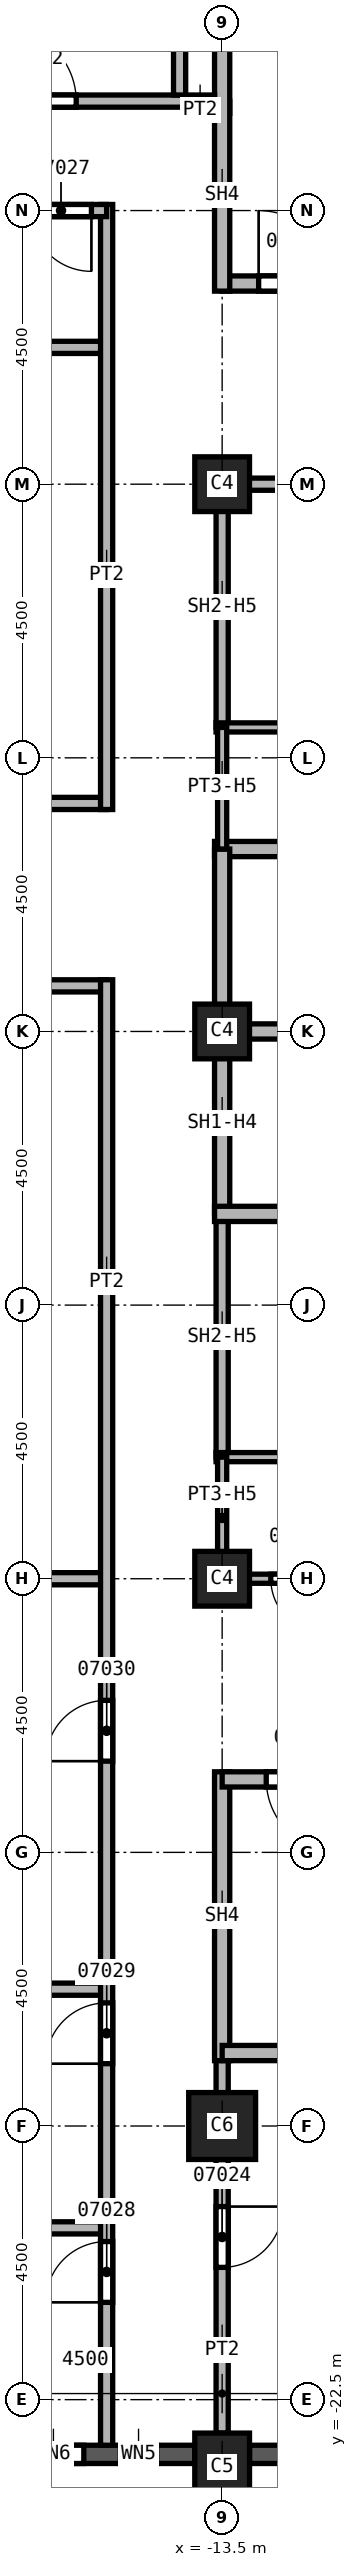
"""IFC4 building model, lengths in metres.
Left out: names, types, materials, properties, quantities, classifications, styles, units other than length and angle.
Written with IfcOpenShell. Run it as: python <this file> out.ifc"""

import sys

from ifc_helpers import new_model, si_unit, direction, frame, frame_2d, origin, origin_2d, place, context, subcontext, project, spatial, rectangle, extrude, element, fill, save


model = new_model("IFC4")
c1 = context("Model", 3, precision=1e-05, world=origin(), true_north=direction((0.0, 1.0)))
c2 = subcontext(c1, "Body", "Model", "MODEL_VIEW")
j1 = project(units=[si_unit("LENGTHUNIT", "METRE"), si_unit("PLANEANGLEUNIT", "RADIAN")], contexts=[c1])
p1 = place(None, origin())
s1 = spatial("IfcSite", under=j1, at=p1, CompositionType="ELEMENT")
p2 = place(p1, origin())
s2 = spatial("IfcBuilding", under=s1, at=p2, CompositionType="ELEMENT")
p3 = place(p2, frame((0.0, 0.0, 138.0)))
s3 = spatial("IfcBuildingStorey", under=s2, at=p3, CompositionType="ELEMENT", Elevation=138.0)
p4 = place(p3, frame((-13.5, -18.0, 0.0), z_axis=(0.0, 0.0, 1.0), x_axis=(1.0, 0.0, 0.0)))
e1 = element("IfcColumn", 1, at=p4, inside=s3, PredefinedType="COLUMN", context=c2, shape_type="SweptSolid", body=[
    extrude(rectangle(XDim=1.1, YDim=1.1, at=origin_2d()), origin(), (0.0, 0.0, 1.0), 3.7),
])
for number, where, z_axis, x_axis in (
    (2, (-13.5, 0.0, 0.0), (0.0, 0.0, 1.0), (1.0, 0.0, 0.0)),
    (3, (-13.5, 9.0, 0.0), (0.0, 0.0, 1.0), (1.0, 0.0, 0.0)),
    (4, (-13.5, -9.0, 0.0), (0.0, 0.0, 1.0), (1.0, 0.0, 0.0)),
):
    element("IfcColumn", number, at=place(p3, frame(where, z_axis=z_axis, x_axis=x_axis)), inside=s3, PredefinedType="COLUMN", context=c2, shape_type="SweptSolid", body=[
        extrude(rectangle(XDim=0.9, YDim=0.9, at=origin_2d()), origin(), (0.0, 0.0, 1.0), 3.7),
    ])
p5 = place(p3, frame((-13.5, -23.6, 0.0), z_axis=(0.0, 0.0, 1.0), x_axis=(1.0, 0.0, 0.0)))
e5 = element("IfcColumn", 5, at=p5, inside=s3, PredefinedType="COLUMN", context=c2, shape_type="SweptSolid", body=[
    extrude(rectangle(XDim=0.9, YDim=1.1, at=origin_2d()), origin(), (0.0, 0.0, 1.0), 3.7),
])
p6 = place(p3, frame((-17.55, -23.4, 0.0), z_axis=(0.0, 0.0, 1.0), x_axis=(1.0, 0.0, 0.0)))
e6 = element("IfcWall", 6, at=p6, inside=s3, PredefinedType="SOLIDWALL", context=c2, shape_type="SweptSolid", body=[
    extrude(rectangle(XDim=3.6, YDim=0.3, at=frame_2d((1.8, 0.0))), origin(), (0.0, 0.0, 1.0), 3.1),
])
p7 = place(p6, frame((0.775, 0.0, 0.8)))
e7 = element("IfcOpeningElement", 7, at=p7, cuts=e6, PredefinedType="OPENING", context=c2, shape_type="SweptSolid", body=[
    extrude(rectangle(XDim=1.0, YDim=1.95, at=frame_2d((0.5, 0.975))), frame((0.0, 0.15, 0.0), z_axis=(0.0, -1.0, 0.0), x_axis=(1.0, 0.0, 0.0)), (0.0, 0.0, 1.0), 0.3),
])
p8 = place(p6, frame((2.375, 0.0, 0.8)))
e8 = element("IfcOpeningElement", 8, at=p8, cuts=e6, PredefinedType="OPENING", context=c2, shape_type="SweptSolid", body=[
    extrude(rectangle(XDim=0.6, YDim=1.95, at=frame_2d((0.3, 0.975))), frame((0.0, 0.15, 0.0), z_axis=(0.0, -1.0, 0.0), x_axis=(1.0, 0.0, 0.0)), (0.0, 0.0, 1.0), 0.3),
])
p9 = place(p3, frame((-13.05, -23.4, 0.0), z_axis=(0.0, 0.0, 1.0), x_axis=(1.0, 0.0, 0.0)))
e9 = element("IfcWall", 9, at=p9, inside=s3, PredefinedType="SOLIDWALL", context=c2, shape_type="SweptSolid", body=[
    extrude(rectangle(XDim=3.6, YDim=0.3, at=frame_2d((1.8, 0.0))), origin(), (0.0, 0.0, 1.0), 3.1),
])
p10 = place(p9, frame((0.6, 0.0, 0.8)))
e10 = element("IfcOpeningElement", 10, at=p10, cuts=e9, PredefinedType="OPENING", context=c2, shape_type="SweptSolid", body=[
    extrude(rectangle(XDim=2.4, YDim=1.95, at=frame_2d((1.2, 0.975))), frame((0.0, 0.15, 0.0), z_axis=(0.0, -1.0, 0.0), x_axis=(1.0, 0.0, 0.0)), (0.0, 0.0, 1.0), 0.3),
])
p11 = place(p3, frame((-33.85, 3.75, 0.0), z_axis=(0.0, 0.0, 1.0), x_axis=(1.0, 0.0, 0.0)))
e11 = element("IfcWall", 11, at=p11, inside=s3, PredefinedType="PARTITIONING", context=c2, shape_type="SweptSolid", body=[
    extrude(rectangle(XDim=18.45, YDim=0.2, at=frame_2d((9.225, 0.0))), origin(), (0.0, 0.0, 1.0), 3.7),
])
p12 = place(p11, frame((10.3, 0.0, 0.0)))
e12 = element("IfcOpeningElement", 12, at=p12, cuts=e11, PredefinedType="OPENING", context=c2, shape_type="SweptSolid", body=[
    extrude(rectangle(XDim=1.0, YDim=2.1, at=frame_2d((0.5, 1.05))), frame((0.0, 0.1, 0.0), z_axis=(0.0, -1.0, 0.0), x_axis=(1.0, 0.0, 0.0)), (0.0, 0.0, 1.0), 0.2),
])
p13 = place(p3, frame((-15.4, 0.75, 0.0), z_axis=(0.0, 0.0, 1.0), x_axis=(-1.0, 0.0, 0.0)))
e13 = element("IfcWall", 13, at=p13, inside=s3, PredefinedType="PARTITIONING", context=c2, shape_type="SweptSolid", body=[
    extrude(rectangle(XDim=18.45, YDim=0.2, at=frame_2d((9.225, 0.0))), origin(), (0.0, 0.0, 1.0), 3.7),
])
p14 = place(p13, frame((5.35, 0.0, 0.0)))
e14 = element("IfcOpeningElement", 14, at=p14, cuts=e13, PredefinedType="OPENING", context=c2, shape_type="SweptSolid", body=[
    extrude(rectangle(XDim=1.0, YDim=2.1, at=frame_2d((0.5, 1.05))), frame((0.0, 0.1, 0.0), z_axis=(0.0, -1.0, 0.0), x_axis=(1.0, 0.0, 0.0)), (0.0, 0.0, 1.0), 0.2),
])
p15 = place(p13, frame((12.65, 0.0, 0.0)))
e15 = element("IfcOpeningElement", 15, at=p15, cuts=e13, PredefinedType="OPENING", context=c2, shape_type="SweptSolid", body=[
    extrude(rectangle(XDim=1.0, YDim=2.1, at=frame_2d((0.5, 1.05))), frame((0.0, 0.1, 0.0), z_axis=(0.0, -1.0, 0.0), x_axis=(1.0, 0.0, 0.0)), (0.0, 0.0, 1.0), 0.2),
])
for number, where, z_axis, x_axis in (
    (16, (-27.1, -15.75, 0.0), (0.0, 0.0, 1.0), (1.0, 0.0, 0.0)),
    (17, (-27.1, -9.0, 0.0), (0.0, 0.0, 1.0), (1.0, 0.0, 0.0)),
    (18, (-27.1, 11.25, 0.0), (0.0, 0.0, 1.0), (1.0, 0.0, 0.0)),
):
    element("IfcWall", number, at=place(p3, frame(where, z_axis=z_axis, x_axis=x_axis)), inside=s3, PredefinedType="PARTITIONING", context=c2, shape_type="SweptSolid", body=[
        extrude(rectangle(XDim=11.7, YDim=0.2, at=frame_2d((5.85, 0.0))), origin(), (0.0, 0.0, 1.0), 3.7),
    ])
p16 = place(p3, frame((-24.3, -19.675, 0.0), z_axis=(0.0, 0.0, 1.0), x_axis=(1.0, 0.0, 0.0)))
e19 = element("IfcWall", 19, at=p16, inside=s3, PredefinedType="PARTITIONING", context=c2, shape_type="SweptSolid", body=[
    extrude(rectangle(XDim=8.9, YDim=0.2, at=frame_2d((4.45, 0.0))), origin(), (0.0, 0.0, 1.0), 3.7),
])
p17 = place(p3, frame((-15.4, -23.25, 0.0), z_axis=(0.0, 0.0, 1.0), x_axis=(0.0, 1.0, 0.0)))
e20 = element("IfcWall", 20, at=p17, inside=s3, PredefinedType="PARTITIONING", context=c2, shape_type="SweptSolid", body=[
    extrude(rectangle(XDim=24.1, YDim=0.2, at=frame_2d((12.05, 0.0))), origin(), (0.0, 0.0, 1.0), 3.7),
])
p18 = place(p17, frame((2.35, 0.0, 0.0)))
e21 = element("IfcOpeningElement", 21, at=p18, cuts=e20, PredefinedType="OPENING", context=c2, shape_type="SweptSolid", body=[
    extrude(rectangle(XDim=1.0, YDim=2.1, at=frame_2d((0.5, 1.05))), frame((0.0, 0.1, 0.0), z_axis=(0.0, -1.0, 0.0), x_axis=(1.0, 0.0, 0.0)), (0.0, 0.0, 1.0), 0.2),
])
p19 = place(p17, frame((6.275, 0.0, 0.0)))
e22 = element("IfcOpeningElement", 22, at=p19, cuts=e20, PredefinedType="OPENING", context=c2, shape_type="SweptSolid", body=[
    extrude(rectangle(XDim=1.0, YDim=2.1, at=frame_2d((0.5, 1.05))), frame((0.0, 0.1, 0.0), z_axis=(0.0, -1.0, 0.0), x_axis=(1.0, 0.0, 0.0)), (0.0, 0.0, 1.0), 0.2),
])
p20 = place(p17, frame((11.25, 0.0, 0.0)))
e23 = element("IfcOpeningElement", 23, at=p20, cuts=e20, PredefinedType="OPENING", context=c2, shape_type="SweptSolid", body=[
    extrude(rectangle(XDim=1.0, YDim=2.1, at=frame_2d((0.5, 1.05))), frame((0.0, 0.1, 0.0), z_axis=(0.0, -1.0, 0.0), x_axis=(1.0, 0.0, 0.0)), (0.0, 0.0, 1.0), 0.2),
])
p21 = place(p3, frame((-15.4, 3.65, 0.0), z_axis=(0.0, 0.0, 1.0), x_axis=(0.0, 1.0, 0.0)))
e24 = element("IfcWall", 24, at=p21, inside=s3, PredefinedType="PARTITIONING", context=c2, shape_type="SweptSolid", body=[
    extrude(rectangle(XDim=9.95, YDim=0.2, at=frame_2d((4.975, 0.0))), origin(), (0.0, 0.0, 1.0), 3.7),
])
p22 = place(p3, frame((-15.4, 13.5, 0.0), z_axis=(0.0, 0.0, 1.0), x_axis=(-1.0, 0.0, 0.0)))
e25 = element("IfcWall", 25, at=p22, inside=s3, PredefinedType="PARTITIONING", context=c2, shape_type="SweptSolid", body=[
    extrude(rectangle(XDim=6.6, YDim=0.2, at=frame_2d((3.3, 0.0))), origin(), (0.0, 0.0, 1.0), 3.7),
])
p23 = place(p22, frame((0.25, 0.0, 0.0)))
e26 = element("IfcOpeningElement", 26, at=p23, cuts=e25, PredefinedType="OPENING", context=c2, shape_type="SweptSolid", body=[
    extrude(rectangle(XDim=1.0, YDim=2.1, at=frame_2d((0.5, 1.05))), frame((0.0, 0.1, 0.0), z_axis=(0.0, -1.0, 0.0), x_axis=(1.0, 0.0, 0.0)), (0.0, 0.0, 1.0), 0.2),
])
p24 = place(p3, frame((-14.1, 15.2, 0.0), z_axis=(0.0, 0.0, 1.0), x_axis=(1.0, 0.0, 0.0)))
e27 = element("IfcWall", 27, at=p24, inside=s3, PredefinedType="PARTITIONING", context=c2, shape_type="SweptSolid", body=[
    extrude(rectangle(XDim=0.725, YDim=0.2, at=frame_2d((0.363, 0.0))), origin(), (0.0, 0.0, 1.0), 3.7),
])
p25 = place(p3, frame((-13.5, -16.675, 0.0), z_axis=(0.0, 0.0, 1.0), x_axis=(0.0, -1.0, 0.0)))
e28 = element("IfcWall", 28, at=p25, inside=s3, PredefinedType="PARTITIONING", context=c2, shape_type="SweptSolid", body=[
    extrude(rectangle(XDim=6.375, YDim=0.2, at=frame_2d((3.188, 0.0))), origin(), (0.0, 0.0, 1.0), 3.7),
])
p26 = place(p25, frame((2.65, 0.0, 0.0)))
e29 = element("IfcOpeningElement", 29, at=p26, cuts=e28, PredefinedType="OPENING", context=c2, shape_type="SweptSolid", body=[
    extrude(rectangle(XDim=1.0, YDim=2.1, at=frame_2d((0.5, 1.05))), frame((0.0, 0.1, 0.0), z_axis=(0.0, -1.0, 0.0), x_axis=(1.0, 0.0, 0.0)), (0.0, 0.0, 1.0), 0.2),
])
p27 = place(p3, frame((-13.5, -7.0, 0.0), z_axis=(0.0, 0.0, 1.0), x_axis=(0.0, 1.0, 0.0)))
e30 = element("IfcWall", 30, at=p27, inside=s3, PredefinedType="SOLIDWALL", context=c2, shape_type="SweptSolid", body=[
    extrude(rectangle(XDim=4.0, YDim=0.2, at=frame_2d((2.0, 0.0))), origin(), (0.0, 0.0, 1.0), 2.938),
])
p28 = place(p3, frame((-13.5, 5.0, 0.0), z_axis=(0.0, 0.0, 1.0), x_axis=(0.0, 1.0, 0.0)))
e31 = element("IfcWall", 31, at=p28, inside=s3, PredefinedType="SOLIDWALL", context=c2, shape_type="SweptSolid", body=[
    extrude(rectangle(XDim=4.1, YDim=0.2, at=frame_2d((2.05, 0.0))), origin(), (0.0, 0.0, 1.0), 2.938),
])
p29 = place(p3, frame((-13.5, 9.0, 0.0), z_axis=(0.0, 0.0, 1.0), x_axis=(1.0, 0.0, 0.0)))
e32 = element("IfcWall", 32, at=p29, inside=s3, PredefinedType="SOLIDWALL", context=c2, shape_type="SweptSolid", body=[
    extrude(rectangle(XDim=3.0, YDim=0.2, at=frame_2d((1.5, 0.0))), origin(), (0.0, 0.0, 1.0), 2.938),
])
p30 = place(p3, frame((-13.625, 0.0, 0.0), z_axis=(0.0, 0.0, 1.0), x_axis=(1.0, 0.0, 0.0)))
e33 = element("IfcWall", 33, at=p30, inside=s3, PredefinedType="SOLIDWALL", context=c2, shape_type="SweptSolid", body=[
    extrude(rectangle(XDim=3.125, YDim=0.25, at=frame_2d((1.562, 0.0))), origin(), (0.0, 0.0, 1.0), 3.7),
])
p31 = place(p3, frame((-13.625, 3.0, 0.0), z_axis=(0.0, 0.0, 1.0), x_axis=(1.0, 0.0, 0.0)))
e34 = element("IfcWall", 34, at=p31, inside=s3, PredefinedType="SOLIDWALL", context=c2, shape_type="SweptSolid", body=[
    extrude(rectangle(XDim=6.125, YDim=0.25, at=frame_2d((3.062, 0.0))), origin(), (0.0, 0.0, 1.0), 3.7),
])
p32 = place(p31, frame((3.25, 0.0, 0.0)))
e35 = element("IfcOpeningElement", 35, at=p32, cuts=e34, PredefinedType="OPENING", context=c2, shape_type="SweptSolid", body=[
    extrude(rectangle(XDim=1.1, YDim=2.1, at=frame_2d((0.55, 1.05))), frame((0.0, 0.125, 0.0), z_axis=(0.0, -1.0, 0.0), x_axis=(1.0, 0.0, 0.0)), (0.0, 0.0, 1.0), 0.25),
])
p33 = place(p3, frame((-13.5, -3.0, 0.0), z_axis=(0.0, 0.0, 1.0), x_axis=(0.0, 1.0, 0.0)))
e36 = element("IfcWall", 36, at=p33, inside=s3, PredefinedType="SOLIDWALL", context=c2, shape_type="SweptSolid", body=[
    extrude(rectangle(XDim=6.0, YDim=0.25, at=frame_2d((3.0, 0.0))), origin(), (0.0, 0.0, 1.0), 2.938),
])
p34 = place(p3, frame((-13.625, -3.0, 0.0), z_axis=(0.0, 0.0, 1.0), x_axis=(1.0, 0.0, 0.0)))
e37 = element("IfcWall", 37, at=p34, inside=s3, PredefinedType="SOLIDWALL", context=c2, shape_type="SweptSolid", body=[
    extrude(rectangle(XDim=9.25, YDim=0.25, at=frame_2d((4.625, 0.0))), origin(), (0.0, 0.0, 1.0), 3.7),
])
p35 = place(p34, frame((3.25, 0.0, 0.0)))
e38 = element("IfcOpeningElement", 38, at=p35, cuts=e37, PredefinedType="OPENING", context=c2, shape_type="SweptSolid", body=[
    extrude(rectangle(XDim=1.1, YDim=2.1, at=frame_2d((0.55, 1.05))), frame((0.0, 0.125, 0.0), z_axis=(0.0, -1.0, 0.0), x_axis=(1.0, 0.0, 0.0)), (0.0, 0.0, 1.0), 0.25),
])
p36 = place(p3, frame((-13.5, -12.175, 0.0), z_axis=(0.0, 0.0, 1.0), x_axis=(0.0, -1.0, 0.0)))
e39 = element("IfcWall", 39, at=p36, inside=s3, PredefinedType="SOLIDWALL", context=c2, shape_type="SweptSolid", body=[
    extrude(rectangle(XDim=4.75, YDim=0.25, at=frame_2d((2.375, 0.0))), origin(), (0.0, 0.0, 1.0), 3.7),
])
p37 = place(p3, frame((-13.5, 12.3, 0.0), z_axis=(0.0, 0.0, 1.0), x_axis=(1.0, 0.0, 0.0)))
e40 = element("IfcWall", 40, at=p37, inside=s3, PredefinedType="SOLIDWALL", context=c2, shape_type="SweptSolid", body=[
    extrude(rectangle(XDim=9.125, YDim=0.25, at=frame_2d((4.562, 0.0))), origin(), (0.0, 0.0, 1.0), 3.7),
])
p38 = place(p37, frame((0.6, 0.0, 0.0)))
e41 = element("IfcOpeningElement", 41, at=p38, cuts=e40, PredefinedType="OPENING", context=c2, shape_type="SweptSolid", body=[
    extrude(rectangle(XDim=1.2, YDim=2.1, at=frame_2d((0.6, 1.05))), frame((0.0, 0.125, 0.0), z_axis=(0.0, -1.0, 0.0), x_axis=(1.0, 0.0, 0.0)), (0.0, 0.0, 1.0), 0.25),
])
p39 = place(p3, frame((-13.5, 12.175, 0.0), z_axis=(0.0, 0.0, 1.0), x_axis=(0.0, 1.0, 0.0)))
e42 = element("IfcWall", 42, at=p39, inside=s3, PredefinedType="SOLIDWALL", context=c2, shape_type="SweptSolid", body=[
    extrude(rectangle(XDim=4.75, YDim=0.25, at=frame_2d((2.375, 0.0))), origin(), (0.0, 0.0, 1.0), 3.7),
])
p40 = place(p3, frame((-4.5, -16.8, 0.0), z_axis=(0.0, 0.0, 1.0), x_axis=(-1.0, 0.0, 0.0)))
e43 = element("IfcWall", 43, at=p40, inside=s3, PredefinedType="SOLIDWALL", context=c2, shape_type="SweptSolid", body=[
    extrude(rectangle(XDim=9.0, YDim=0.25, at=frame_2d((4.5, 0.0))), origin(), (0.0, 0.0, 1.0), 3.7),
])
p41 = place(p3, frame((-4.375, -12.3, 0.0), z_axis=(0.0, 0.0, 1.0), x_axis=(-1.0, 0.0, 0.0)))
e44 = element("IfcWall", 44, at=p41, inside=s3, PredefinedType="SOLIDWALL", context=c2, shape_type="SweptSolid", body=[
    extrude(rectangle(XDim=9.125, YDim=0.25, at=frame_2d((4.562, 0.0))), origin(), (0.0, 0.0, 1.0), 3.7),
])
p42 = place(p41, frame((7.2, 0.0, 0.0)))
e45 = element("IfcOpeningElement", 45, at=p42, cuts=e44, PredefinedType="OPENING", context=c2, shape_type="SweptSolid", body=[
    extrude(rectangle(XDim=1.2, YDim=2.1, at=frame_2d((0.6, 1.05))), frame((0.0, 0.125, 0.0), z_axis=(0.0, -1.0, 0.0), x_axis=(1.0, 0.0, 0.0)), (0.0, 0.0, 1.0), 0.25),
])
for number, where, z_axis, x_axis in (
    (46, (-13.6, -7.0, 0.0), (0.0, 0.0, 1.0), (1.0, 0.0, 0.0)),
    (47, (-13.6, 5.0, 0.0), (0.0, 0.0, 1.0), (1.0, 0.0, 0.0)),
):
    element("IfcWall", number, at=place(p3, frame(where, z_axis=z_axis, x_axis=x_axis)), inside=s3, PredefinedType="PARTITIONING", context=c2, shape_type="SweptSolid", body=[
        extrude(rectangle(XDim=3.1, YDim=0.15, at=frame_2d((1.55, 0.0))), origin(), (0.0, 0.0, 1.0), 3.7),
    ])
p43 = place(p3, frame((-13.5, -9.075, 0.0), z_axis=(0.0, 0.0, 1.0), x_axis=(0.0, 1.0, 0.0)))
e48 = element("IfcWall", 48, at=p43, inside=s3, PredefinedType="PARTITIONING", context=c2, shape_type="SweptSolid", body=[
    extrude(rectangle(XDim=2.075, YDim=0.15, at=frame_2d((1.038, 0.0))), origin(), (0.0, 0.0, 1.0), 2.938),
])
p44 = place(p3, frame((-13.5, 3.0, 0.0), z_axis=(0.0, 0.0, 1.0), x_axis=(0.0, 1.0, 0.0)))
e49 = element("IfcWall", 49, at=p44, inside=s3, PredefinedType="PARTITIONING", context=c2, shape_type="SweptSolid", body=[
    extrude(rectangle(XDim=2.0, YDim=0.15, at=frame_2d((1.0, 0.0))), origin(), (0.0, 0.0, 1.0), 2.938),
])
p45 = place(p3, frame((-10.5, -9.0, 0.0), z_axis=(0.0, 0.0, 1.0), x_axis=(-1.0, 0.0, 0.0)))
e50 = element("IfcWall", 50, at=p45, inside=s3, PredefinedType="PARTITIONING", context=c2, shape_type="SweptSolid", body=[
    extrude(rectangle(XDim=3.0, YDim=0.15, at=frame_2d((1.5, 0.0))), origin(), (0.0, 0.0, 1.0), 2.938),
])
p46 = place(p45, frame((1.3, 0.0, 0.0)))
e51 = element("IfcOpeningElement", 51, at=p46, cuts=e50, PredefinedType="OPENING", context=c2, shape_type="SweptSolid", body=[
    extrude(rectangle(XDim=0.9, YDim=2.1, at=frame_2d((0.45, 1.05))), frame((0.0, 0.075, 0.0), z_axis=(0.0, -1.0, 0.0), x_axis=(1.0, 0.0, 0.0)), (0.0, 0.0, 1.0), 0.15),
])
p47 = place(p3, frame((-21.9, 15.3, 0.0), z_axis=(0.0, 0.0, 1.0), x_axis=(1.0, 0.0, 0.0)))
e52 = element("IfcWall", 52, at=p47, inside=s3, PredefinedType="SOLIDWALL", context=c2, shape_type="SweptSolid", body=[
    extrude(rectangle(XDim=8.275, YDim=0.2, at=frame_2d((4.137, 0.0))), origin(), (0.0, 0.0, 1.0), 3.7),
])
p48 = place(p47, frame((4.8, 0.0, 0.0)))
e53 = element("IfcOpeningElement", 53, at=p48, cuts=e52, PredefinedType="OPENING", context=c2, shape_type="SweptSolid", body=[
    extrude(rectangle(XDim=1.2, YDim=2.1, at=frame_2d((0.6, 1.05))), frame((0.0, 0.1, 0.0), z_axis=(0.0, -1.0, 0.0), x_axis=(1.0, 0.0, 0.0)), (0.0, 0.0, 1.0), 0.2),
])
p49 = place(p3, frame((-14.2, 15.4, 0.0), z_axis=(0.0, 0.0, 1.0), x_axis=(0.0, 1.0, 0.0)))
e54 = element("IfcWall", 54, at=p49, inside=s3, PredefinedType="SOLIDWALL", context=c2, shape_type="SweptSolid", body=[
    extrude(rectangle(XDim=5.9, YDim=0.2, at=frame_2d((2.95, 0.0))), origin(), (0.0, 0.0, 1.0), 3.7),
])
p50 = place(p46, origin())
e55 = element("IfcDoor", 55, at=p50, inside=s3, OperationType="SINGLE_SWING_LEFT", PredefinedType="DOOR", context=c2, shape_type="SweptSolid", body=[
    extrude(rectangle(XDim=0.9, YDim=2.1, at=frame_2d((0.45, 1.05))), frame((0.0, 0.025, 0.0), z_axis=(0.0, -1.0, 0.0), x_axis=(1.0, 0.0, 0.0)), (0.0, 0.0, 1.0), 0.05),
])
fill(e51, e55)
p51 = place(p38, origin())
e56 = element("IfcDoor", 56, at=p51, inside=s3, OperationType="SINGLE_SWING_LEFT", PredefinedType="DOOR", context=c2, shape_type="SweptSolid", body=[
    extrude(rectangle(XDim=1.2, YDim=2.1, at=frame_2d((0.6, 1.05))), frame((0.0, 0.025, 0.0), z_axis=(0.0, -1.0, 0.0), x_axis=(1.0, 0.0, 0.0)), (0.0, 0.0, 1.0), 0.05),
])
fill(e41, e56)
p52 = place(p42, origin())
e57 = element("IfcDoor", 57, at=p52, inside=s3, OperationType="SINGLE_SWING_RIGHT", PredefinedType="DOOR", context=c2, shape_type="SweptSolid", body=[
    extrude(rectangle(XDim=1.2, YDim=2.1, at=frame_2d((0.6, 1.05))), frame((0.0, 0.025, 0.0), z_axis=(0.0, -1.0, 0.0), x_axis=(1.0, 0.0, 0.0)), (0.0, 0.0, 1.0), 0.05),
])
fill(e45, e57)
p53 = place(p26, origin())
e58 = element("IfcDoor", 58, at=p53, inside=s3, OperationType="SINGLE_SWING_LEFT", PredefinedType="DOOR", context=c2, shape_type="SweptSolid", body=[
    extrude(rectangle(XDim=1.0, YDim=2.1, at=frame_2d((0.5, 1.05))), frame((0.0, 0.025, 0.0), z_axis=(0.0, -1.0, 0.0), x_axis=(1.0, 0.0, 0.0)), (0.0, 0.0, 1.0), 0.05),
])
fill(e29, e58)
p54 = place(p23, origin())
e59 = element("IfcDoor", 59, at=p54, inside=s3, OperationType="SINGLE_SWING_RIGHT", PredefinedType="DOOR", context=c2, shape_type="SweptSolid", body=[
    extrude(rectangle(XDim=1.0, YDim=2.1, at=frame_2d((0.5, 1.05))), frame((0.0, 0.025, 0.0), z_axis=(0.0, -1.0, 0.0), x_axis=(1.0, 0.0, 0.0)), (0.0, 0.0, 1.0), 0.05),
])
fill(e26, e59)
p55 = place(p18, origin())
e60 = element("IfcDoor", 60, at=p55, inside=s3, OperationType="SINGLE_SWING_LEFT", PredefinedType="DOOR", context=c2, shape_type="SweptSolid", body=[
    extrude(rectangle(XDim=1.0, YDim=2.1, at=frame_2d((0.5, 1.05))), frame((0.0, 0.025, 0.0), z_axis=(0.0, -1.0, 0.0), x_axis=(1.0, 0.0, 0.0)), (0.0, 0.0, 1.0), 0.05),
])
fill(e21, e60)
p56 = place(p19, origin())
e61 = element("IfcDoor", 61, at=p56, inside=s3, OperationType="SINGLE_SWING_RIGHT", PredefinedType="DOOR", context=c2, shape_type="SweptSolid", body=[
    extrude(rectangle(XDim=1.0, YDim=2.1, at=frame_2d((0.5, 1.05))), frame((0.0, 0.025, 0.0), z_axis=(0.0, -1.0, 0.0), x_axis=(1.0, 0.0, 0.0)), (0.0, 0.0, 1.0), 0.05),
])
fill(e22, e61)
p57 = place(p20, origin())
e62 = element("IfcDoor", 62, at=p57, inside=s3, OperationType="SINGLE_SWING_LEFT", PredefinedType="DOOR", context=c2, shape_type="SweptSolid", body=[
    extrude(rectangle(XDim=1.0, YDim=2.1, at=frame_2d((0.5, 1.05))), frame((0.0, 0.025, 0.0), z_axis=(0.0, -1.0, 0.0), x_axis=(1.0, 0.0, 0.0)), (0.0, 0.0, 1.0), 0.05),
])
fill(e23, e62)
p58 = place(p48, origin())
e63 = element("IfcDoor", 63, at=p58, inside=s3, OperationType="SINGLE_SWING_RIGHT", PredefinedType="DOOR", context=c2, shape_type="SweptSolid", body=[
    extrude(rectangle(XDim=1.2, YDim=2.1, at=frame_2d((0.6, 1.05))), frame((0.0, 0.025, 0.0), z_axis=(0.0, -1.0, 0.0), x_axis=(1.0, 0.0, 0.0)), (0.0, 0.0, 1.0), 0.05),
])
fill(e53, e63)
p59 = place(p7, origin())
e64 = element("IfcWindow", 64, at=p59, inside=s3, PartitioningType="SINGLE_PANEL", PredefinedType="WINDOW", context=c2, shape_type="SweptSolid", body=[
    extrude(rectangle(XDim=1.0, YDim=1.95, at=frame_2d((0.5, 0.975))), frame((0.0, 0.03, 0.0), z_axis=(0.0, -1.0, 0.0), x_axis=(1.0, 0.0, 0.0)), (0.0, 0.0, 1.0), 0.06),
])
fill(e7, e64)
p60 = place(p8, origin())
e65 = element("IfcWindow", 65, at=p60, inside=s3, PartitioningType="SINGLE_PANEL", PredefinedType="WINDOW", context=c2, shape_type="SweptSolid", body=[
    extrude(rectangle(XDim=0.6, YDim=1.95, at=frame_2d((0.3, 0.975))), frame((0.0, 0.03, 0.0), z_axis=(0.0, -1.0, 0.0), x_axis=(1.0, 0.0, 0.0)), (0.0, 0.0, 1.0), 0.06),
])
fill(e8, e65)
save(model, sys.argv[1])
